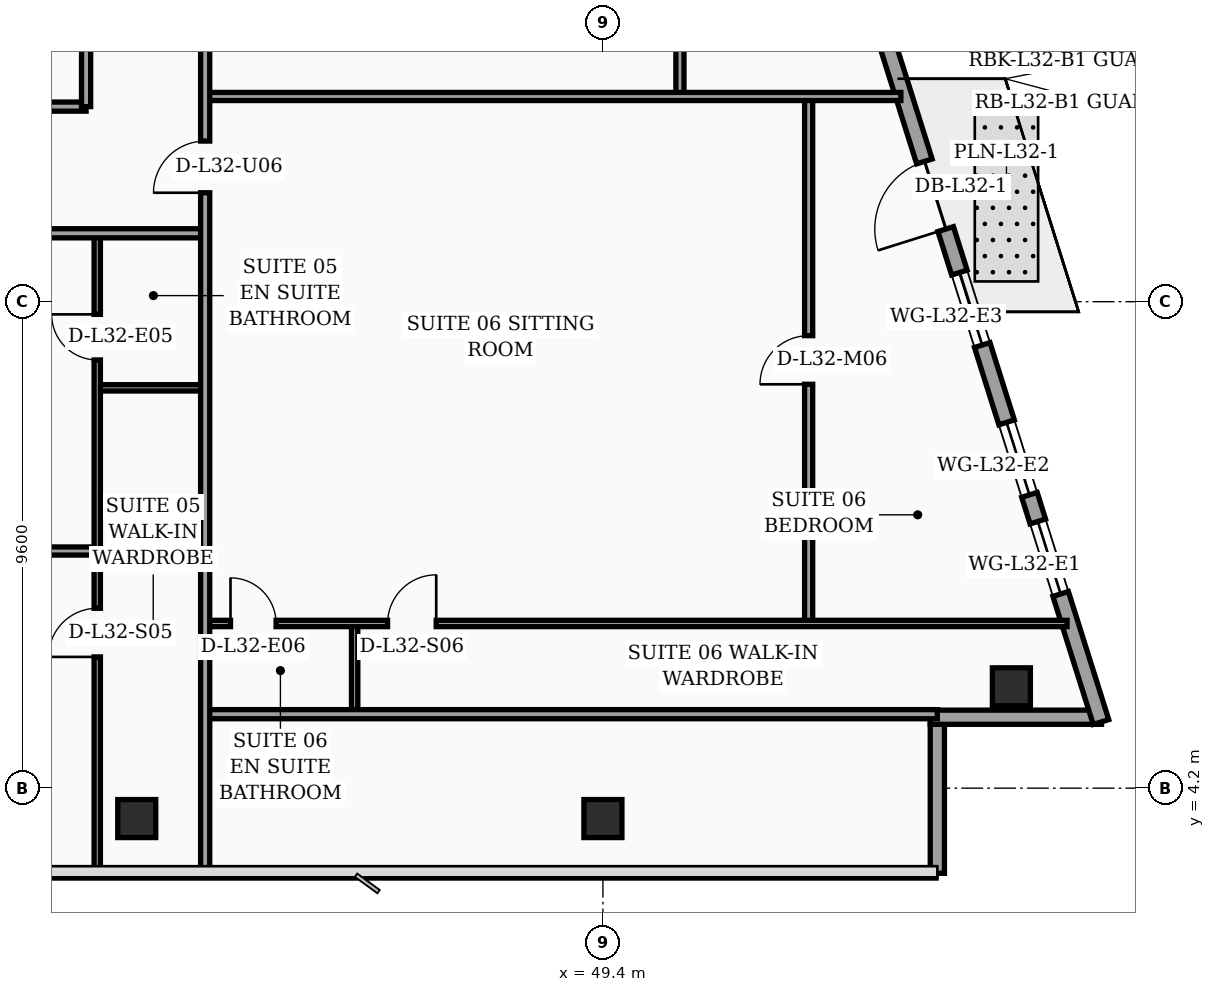
"""IFC4 building model, lengths in metres.
Left out: names, types, materials, properties, quantities, classifications, styles, units other than length and angle.
Written with IfcOpenShell. Run it as: python <this file> out.ifc"""

import sys

from ifc_helpers import new_model, si_unit, direction, frame, frame_2d, origin, origin_2d, place, context, subcontext, project, spatial, rectangle, hollow_rectangle, extrude, element, fill, save


model = new_model("IFC4")
c1 = context("Model", 3, precision=1e-05, world=origin(), true_north=direction((0.0, 1.0)))
c2 = subcontext(c1, "Body", "Model", "MODEL_VIEW")
j1 = project(units=[si_unit("LENGTHUNIT", "METRE"), si_unit("PLANEANGLEUNIT", "RADIAN")], contexts=[c1])
p1 = place(None, origin())
s1 = spatial("IfcSite", under=j1, at=p1, CompositionType="ELEMENT")
p2 = place(p1, origin())
s2 = spatial("IfcBuilding", under=s1, at=p2, CompositionType="ELEMENT")
p3 = place(p2, frame((0.0, 0.0, 131.6)))
s3 = spatial("IfcBuildingStorey", under=s2, at=p3, CompositionType="ELEMENT", Elevation=131.6)
for number, where, z_axis, x_axis in (
    (1, (40.2, 3.6, 0.0), (0.0, 0.0, 1.0), (1.0, 0.0, 0.0)),
    (2, (49.4, 3.6, 0.0), (0.0, 0.0, 1.0), (1.0, 0.0, 0.0)),
    (3, (57.461, 6.2, 0.0), (0.0, 0.0, 1.0), (1.0, 0.0, 0.0)),
):
    element("IfcColumn", number, at=place(p3, frame(where, z_axis=z_axis, x_axis=x_axis)), inside=s3, PredefinedType="COLUMN", context=c2, shape_type="SweptSolid", body=[
        extrude(hollow_rectangle(XDim=0.75, YDim=0.75, WallThickness=0.032, at=origin_2d()), origin(), (0.0, 0.0, 1.0), 3.56),
    ])
p4 = place(p3, frame((56.0, 2.52, 0.0), z_axis=(0.0, 0.0, 1.0), x_axis=(0.0, 1.0, 0.0)))
e4 = element("IfcWall", 4, at=p4, inside=s3, PredefinedType="SOLIDWALL", context=c2, shape_type="SweptSolid", body=[
    extrude(rectangle(XDim=2.94, YDim=0.28, at=frame_2d((1.47, 0.0))), origin(), (0.0, 0.0, 1.0), 3.04),
])
p5 = place(p3, frame((55.86, 5.6, 0.0), z_axis=(0.0, 0.0, 1.0), x_axis=(1.0, 0.0, 0.0)))
e5 = element("IfcWall", 5, at=p5, inside=s3, PredefinedType="SOLIDWALL", context=c2, shape_type="SweptSolid", body=[
    extrude(rectangle(XDim=3.38, YDim=0.28, at=frame_2d((1.69, 0.0))), origin(), (0.0, 0.0, 1.0), 3.04),
])
p6 = place(p3, frame((59.23, 5.505, 0.0), z_axis=(0.0, 0.0, 1.0), x_axis=(-0.300509063924, 0.953778958931, 0.0)))
e6 = element("IfcWall", 6, at=p6, inside=s3, PredefinedType="SOLIDWALL", context=c2, shape_type="SweptSolid", body=[
    extrude(rectangle(XDim=30.814, YDim=0.32, at=frame_2d((15.407, 0.0))), origin(), (0.0, 0.0, 1.0), 3.56),
])
p7 = place(p6, frame((10.199, 0.0, 0.0)))
e7 = element("IfcOpeningElement", 7, at=p7, cuts=e6, PredefinedType="OPENING", context=c2, shape_type="SweptSolid", body=[
    extrude(rectangle(XDim=1.4, YDim=2.25, at=frame_2d((0.7, 1.125))), frame((0.0, 0.17, 0.0), z_axis=(0.0, -1.0, 0.0), x_axis=(1.0, 0.0, 0.0)), (0.0, 0.0, 1.0), 0.34),
])
p8 = place(p6, frame((2.65, 0.0, 0.75)))
e8 = element("IfcOpeningElement", 8, at=p8, cuts=e6, PredefinedType="OPENING", context=c2, shape_type="SweptSolid", body=[
    extrude(rectangle(XDim=1.5, YDim=1.6, at=frame_2d((0.75, 0.8))), frame((0.0, 0.17, 0.0), z_axis=(0.0, -1.0, 0.0), x_axis=(1.0, 0.0, 0.0)), (0.0, 0.0, 1.0), 0.34),
])
p9 = place(p6, frame((4.7, 0.0, 0.75)))
e9 = element("IfcOpeningElement", 9, at=p9, cuts=e6, PredefinedType="OPENING", context=c2, shape_type="SweptSolid", body=[
    extrude(rectangle(XDim=1.5, YDim=1.6, at=frame_2d((0.75, 0.8))), frame((0.0, 0.17, 0.0), z_axis=(0.0, -1.0, 0.0), x_axis=(1.0, 0.0, 0.0)), (0.0, 0.0, 1.0), 0.34),
])
p10 = place(p6, frame((7.8, 0.0, 0.75)))
e10 = element("IfcOpeningElement", 10, at=p10, cuts=e6, PredefinedType="OPENING", context=c2, shape_type="SweptSolid", body=[
    extrude(rectangle(XDim=1.5, YDim=1.6, at=frame_2d((0.75, 0.8))), frame((0.0, 0.17, 0.0), z_axis=(0.0, -1.0, 0.0), x_axis=(1.0, 0.0, 0.0)), (0.0, 0.0, 1.0), 0.34),
])
p11 = place(p6, frame((14.0, 0.0, 0.75)))
e11 = element("IfcOpeningElement", 11, at=p11, cuts=e6, PredefinedType="OPENING", context=c2, shape_type="SweptSolid", body=[
    extrude(rectangle(XDim=1.5, YDim=1.6, at=frame_2d((0.75, 0.8))), frame((0.0, 0.17, 0.0), z_axis=(0.0, -1.0, 0.0), x_axis=(1.0, 0.0, 0.0)), (0.0, 0.0, 1.0), 0.34),
])
p12 = place(p6, frame((17.1, 0.0, 0.75)))
e12 = element("IfcOpeningElement", 12, at=p12, cuts=e6, PredefinedType="OPENING", context=c2, shape_type="SweptSolid", body=[
    extrude(rectangle(XDim=1.5, YDim=1.6, at=frame_2d((0.75, 0.8))), frame((0.0, 0.17, 0.0), z_axis=(0.0, -1.0, 0.0), x_axis=(1.0, 0.0, 0.0)), (0.0, 0.0, 1.0), 0.34),
])
p13 = place(p6, frame((23.3, 0.0, 0.75)))
e13 = element("IfcOpeningElement", 13, at=p13, cuts=e6, PredefinedType="OPENING", context=c2, shape_type="SweptSolid", body=[
    extrude(rectangle(XDim=1.5, YDim=1.6, at=frame_2d((0.75, 0.8))), frame((0.0, 0.17, 0.0), z_axis=(0.0, -1.0, 0.0), x_axis=(1.0, 0.0, 0.0)), (0.0, 0.0, 1.0), 0.34),
])
p14 = place(p6, frame((27.45, 0.0, 0.75)))
e14 = element("IfcOpeningElement", 14, at=p14, cuts=e6, PredefinedType="OPENING", context=c2, shape_type="SweptSolid", body=[
    extrude(rectangle(XDim=1.5, YDim=1.6, at=frame_2d((0.75, 0.8))), frame((0.0, 0.17, 0.0), z_axis=(0.0, -1.0, 0.0), x_axis=(1.0, 0.0, 0.0)), (0.0, 0.0, 1.0), 0.34),
])
p15 = place(p3, frame((39.42, 12.1, 0.0), z_axis=(0.0, 0.0, 1.0), x_axis=(1.0, 0.0, 0.0)))
e15 = element("IfcWall", 15, at=p15, inside=s3, PredefinedType="PARTITIONING", context=c2, shape_type="SweptSolid", body=[
    extrude(rectangle(XDim=2.13, YDim=0.125, at=frame_2d((1.065, 0.0))), origin(), (0.0, 0.0, 1.0), 3.56),
])
p16 = place(p3, frame((32.4, 8.88, 0.0), z_axis=(0.0, 0.0, 1.0), x_axis=(1.0, 0.0, 0.0)))
e16 = element("IfcWall", 16, at=p16, inside=s3, PredefinedType="PARTITIONING", context=c2, shape_type="SweptSolid", body=[
    extrude(rectangle(XDim=7.02, YDim=0.16, at=frame_2d((3.51, 0.0))), origin(), (0.0, 0.0, 1.0), 2.84),
])
p17 = place(p16, frame((3.03, 0.0, 0.0)))
e17 = element("IfcOpeningElement", 17, at=p17, cuts=e16, PredefinedType="OPENING", context=c2, shape_type="SweptSolid", body=[
    extrude(rectangle(XDim=0.96, YDim=2.2, at=frame_2d((0.48, 1.1))), frame((0.0, 0.09, 0.0), z_axis=(0.0, -1.0, 0.0), x_axis=(1.0, 0.0, 0.0)), (0.0, 0.0, 1.0), 0.18),
])
p18 = place(p3, frame((39.42, 2.44, 0.0), z_axis=(0.0, 0.0, 1.0), x_axis=(0.0, 1.0, 0.0)))
e18 = element("IfcWall", 18, at=p18, inside=s3, PredefinedType="PARTITIONING", context=c2, shape_type="SweptSolid", body=[
    extrude(rectangle(XDim=12.71, YDim=0.125, at=frame_2d((6.355, 0.0))), origin(), (0.0, 0.0, 1.0), 2.84),
])
p19 = place(p18, frame((4.35, 0.0, 0.0)))
e19 = element("IfcOpeningElement", 19, at=p19, cuts=e18, PredefinedType="OPENING", context=c2, shape_type="SweptSolid", body=[
    extrude(rectangle(XDim=0.96, YDim=2.2, at=frame_2d((0.48, 1.1))), frame((0.0, 0.073, 0.0), z_axis=(0.0, -1.0, 0.0), x_axis=(1.0, 0.0, 0.0)), (0.0, 0.0, 1.0), 0.145),
])
p20 = place(p18, frame((10.21, 0.0, 0.0)))
e20 = element("IfcOpeningElement", 20, at=p20, cuts=e18, PredefinedType="OPENING", context=c2, shape_type="SweptSolid", body=[
    extrude(rectangle(XDim=0.9, YDim=2.15, at=frame_2d((0.45, 1.075))), frame((0.0, 0.073, 0.0), z_axis=(0.0, -1.0, 0.0), x_axis=(1.0, 0.0, 0.0)), (0.0, 0.0, 1.0), 0.145),
])
p21 = place(p3, frame((32.4, 15.15, 0.0), z_axis=(0.0, 0.0, 1.0), x_axis=(1.0, 0.0, 0.0)))
e21 = element("IfcWall", 21, at=p21, inside=s3, PredefinedType="PARTITIONING", context=c2, shape_type="SweptSolid", body=[
    extrude(rectangle(XDim=9.15, YDim=0.18, at=frame_2d((4.575, 0.0))), origin(), (0.0, 0.0, 1.0), 2.84),
])
p22 = place(p21, frame((3.1, 0.0, 0.0)))
e22 = element("IfcOpeningElement", 22, at=p22, cuts=e21, PredefinedType="OPENING", context=c2, shape_type="SweptSolid", body=[
    extrude(rectangle(XDim=1.02, YDim=2.2, at=frame_2d((0.51, 1.1))), frame((0.0, 0.1, 0.0), z_axis=(0.0, -1.0, 0.0), x_axis=(1.0, 0.0, 0.0)), (0.0, 0.0, 1.0), 0.2),
])
p23 = place(p3, frame((21.5, 17.65, 0.0), z_axis=(0.0, 0.0, 1.0), x_axis=(1.0, 0.0, 0.0)))
e23 = element("IfcWall", 23, at=p23, inside=s3, PredefinedType="PARTITIONING", context=c2, shape_type="SweptSolid", body=[
    extrude(rectangle(XDim=17.7, YDim=0.18, at=frame_2d((8.85, 0.0))), origin(), (0.0, 0.0, 1.0), 2.84),
])
p24 = place(p23, frame((0.95, 0.0, 0.0)))
e24 = element("IfcOpeningElement", 24, at=p24, cuts=e23, PredefinedType="OPENING", context=c2, shape_type="SweptSolid", body=[
    extrude(rectangle(XDim=1.02, YDim=2.2, at=frame_2d((0.51, 1.1))), frame((0.0, 0.1, 0.0), z_axis=(0.0, -1.0, 0.0), x_axis=(1.0, 0.0, 0.0)), (0.0, 0.0, 1.0), 0.2),
])
p25 = place(p23, frame((10.4, 0.0, 0.0)))
e25 = element("IfcOpeningElement", 25, at=p25, cuts=e23, PredefinedType="OPENING", context=c2, shape_type="SweptSolid", body=[
    extrude(rectangle(XDim=1.02, YDim=2.2, at=frame_2d((0.51, 1.1))), frame((0.0, 0.1, 0.0), z_axis=(0.0, -1.0, 0.0), x_axis=(1.0, 0.0, 0.0)), (0.0, 0.0, 1.0), 0.2),
])
p26 = place(p3, frame((39.2, 17.65, 0.0), z_axis=(0.0, 0.0, 1.0), x_axis=(0.0, 1.0, 0.0)))
e26 = element("IfcWall", 26, at=p26, inside=s3, PredefinedType="PARTITIONING", context=c2, shape_type="SweptSolid", body=[
    extrude(rectangle(XDim=16.64, YDim=0.18, at=frame_2d((8.32, 0.0))), origin(), (0.0, 0.0, 1.0), 2.84),
])
p27 = place(p3, frame((44.5, 5.66, 0.0), z_axis=(0.0, 0.0, 1.0), x_axis=(0.0, 1.0, 0.0)))
e27 = element("IfcWall", 27, at=p27, inside=s3, PredefinedType="PARTITIONING", context=c2, shape_type="SweptSolid", body=[
    extrude(rectangle(XDim=1.79, YDim=0.125, at=frame_2d((0.895, 0.0))), origin(), (0.0, 0.0, 1.0), 3.56),
])
p28 = place(p3, frame((53.46, 7.45, 0.0), z_axis=(0.0, 0.0, 1.0), x_axis=(0.0, 1.0, 0.0)))
e28 = element("IfcWall", 28, at=p28, inside=s3, PredefinedType="PARTITIONING", context=c2, shape_type="SweptSolid", body=[
    extrude(rectangle(XDim=10.4, YDim=0.16, at=frame_2d((5.2, 0.0))), origin(), (0.0, 0.0, 1.0), 3.04),
])
p29 = place(p28, frame((4.72, 0.0, 0.0)))
e29 = element("IfcOpeningElement", 29, at=p29, cuts=e28, PredefinedType="OPENING", context=c2, shape_type="SweptSolid", body=[
    extrude(rectangle(XDim=0.96, YDim=2.2, at=frame_2d((0.48, 1.1))), frame((0.0, 0.09, 0.0), z_axis=(0.0, -1.0, 0.0), x_axis=(1.0, 0.0, 0.0)), (0.0, 0.0, 1.0), 0.18),
])
p30 = place(p3, frame((41.55, 7.45, 0.0), z_axis=(0.0, 0.0, 1.0), x_axis=(1.0, 0.0, 0.0)))
e30 = element("IfcWall", 30, at=p30, inside=s3, PredefinedType="PARTITIONING", context=c2, shape_type="SweptSolid", body=[
    extrude(rectangle(XDim=17.01, YDim=0.125, at=frame_2d((8.505, 0.0))), origin(), (0.0, 0.0, 1.0), 2.84),
])
p31 = place(p30, frame((0.5, 0.0, 0.0)))
e31 = element("IfcOpeningElement", 31, at=p31, cuts=e30, PredefinedType="OPENING", context=c2, shape_type="SweptSolid", body=[
    extrude(rectangle(XDim=0.9, YDim=2.15, at=frame_2d((0.45, 1.075))), frame((0.0, 0.073, 0.0), z_axis=(0.0, -1.0, 0.0), x_axis=(1.0, 0.0, 0.0)), (0.0, 0.0, 1.0), 0.145),
])
p32 = place(p30, frame((3.6, 0.0, 0.0)))
e32 = element("IfcOpeningElement", 32, at=p32, cuts=e30, PredefinedType="OPENING", context=c2, shape_type="SweptSolid", body=[
    extrude(rectangle(XDim=0.96, YDim=2.2, at=frame_2d((0.48, 1.1))), frame((0.0, 0.073, 0.0), z_axis=(0.0, -1.0, 0.0), x_axis=(1.0, 0.0, 0.0)), (0.0, 0.0, 1.0), 0.145),
])
p33 = place(p3, frame((41.55, 5.66, 0.0), z_axis=(0.0, 0.0, 1.0), x_axis=(1.0, 0.0, 0.0)))
e33 = element("IfcWall", 33, at=p33, inside=s3, PredefinedType="PARTITIONING", context=c2, shape_type="SweptSolid", body=[
    extrude(rectangle(XDim=14.45, YDim=0.18, at=frame_2d((7.225, 0.0))), origin(), (0.0, 0.0, 1.0), 2.84),
])
p34 = place(p3, frame((50.92, 17.85, 0.0), z_axis=(0.0, 0.0, 1.0), x_axis=(0.0, 1.0, 0.0)))
e34 = element("IfcWall", 34, at=p34, inside=s3, PredefinedType="PARTITIONING", context=c2, shape_type="SweptSolid", body=[
    extrude(rectangle(XDim=5.74, YDim=0.16, at=frame_2d((2.87, 0.0))), origin(), (0.0, 0.0, 1.0), 2.84),
])
p35 = place(p34, frame((2.39, 0.0, 0.0)))
e35 = element("IfcOpeningElement", 35, at=p35, cuts=e34, PredefinedType="OPENING", context=c2, shape_type="SweptSolid", body=[
    extrude(rectangle(XDim=0.96, YDim=2.2, at=frame_2d((0.48, 1.1))), frame((0.0, 0.09, 0.0), z_axis=(0.0, -1.0, 0.0), x_axis=(1.0, 0.0, 0.0)), (0.0, 0.0, 1.0), 0.18),
])
p36 = place(p3, frame((41.55, 17.85, 0.0), z_axis=(0.0, 0.0, 1.0), x_axis=(1.0, 0.0, 0.0)))
e36 = element("IfcWall", 36, at=p36, inside=s3, PredefinedType="PARTITIONING", context=c2, shape_type="SweptSolid", body=[
    extrude(rectangle(XDim=13.73, YDim=0.16, at=frame_2d((6.865, 0.0))), origin(), (0.0, 0.0, 1.0), 2.84),
])
p37 = place(p3, frame((41.55, 2.44, 0.0), z_axis=(0.0, 0.0, 1.0), x_axis=(0.0, 1.0, 0.0)))
e37 = element("IfcWall", 37, at=p37, inside=s3, PredefinedType="PARTITIONING", context=c2, shape_type="SweptSolid", body=[
    extrude(rectangle(XDim=31.04, YDim=0.18, at=frame_2d((15.52, 0.0))), origin(), (0.0, 0.0, 1.0), 2.84),
])
p38 = place(p37, frame((13.51, 0.0, 0.0)))
e38 = element("IfcOpeningElement", 38, at=p38, cuts=e37, PredefinedType="OPENING", context=c2, shape_type="SweptSolid", body=[
    extrude(rectangle(XDim=1.02, YDim=2.2, at=frame_2d((0.51, 1.1))), frame((0.0, 0.1, 0.0), z_axis=(0.0, -1.0, 0.0), x_axis=(1.0, 0.0, 0.0)), (0.0, 0.0, 1.0), 0.2),
])
p39 = place(p37, frame((17.77, 0.0, 0.0)))
e39 = element("IfcOpeningElement", 39, at=p39, cuts=e37, PredefinedType="OPENING", context=c2, shape_type="SweptSolid", body=[
    extrude(rectangle(XDim=1.02, YDim=2.2, at=frame_2d((0.51, 1.1))), frame((0.0, 0.1, 0.0), z_axis=(0.0, -1.0, 0.0), x_axis=(1.0, 0.0, 0.0)), (0.0, 0.0, 1.0), 0.2),
])
p40 = place(p37, frame((25.58, 0.0, 0.0)))
e40 = element("IfcOpeningElement", 40, at=p40, cuts=e37, PredefinedType="OPENING", context=c2, shape_type="SweptSolid", body=[
    extrude(rectangle(XDim=1.02, YDim=2.2, at=frame_2d((0.51, 1.1))), frame((0.0, 0.1, 0.0), z_axis=(0.0, -1.0, 0.0), x_axis=(1.0, 0.0, 0.0)), (0.0, 0.0, 1.0), 0.2),
])
p41 = place(p7, origin())
e41 = element("IfcDoor", 41, at=p41, inside=s3, OperationType="SINGLE_SWING_LEFT", PredefinedType="DOOR", context=c2, shape_type="SweptSolid", body=[
    extrude(rectangle(XDim=1.4, YDim=2.25, at=frame_2d((0.7, 1.125))), frame((0.0, 0.025, 0.0), z_axis=(0.0, -1.0, 0.0), x_axis=(1.0, 0.0, 0.0)), (0.0, 0.0, 1.0), 0.05),
])
fill(e7, e41)
p42 = place(p8, origin())
e42 = element("IfcWindow", 42, at=p42, inside=s3, PartitioningType="SINGLE_PANEL", PredefinedType="WINDOW", context=c2, shape_type="SweptSolid", body=[
    extrude(rectangle(XDim=1.5, YDim=1.6, at=frame_2d((0.75, 0.8))), frame((0.0, 0.03, 0.0), z_axis=(0.0, -1.0, 0.0), x_axis=(1.0, 0.0, 0.0)), (0.0, 0.0, 1.0), 0.06),
])
fill(e8, e42)
p43 = place(p9, origin())
e43 = element("IfcWindow", 43, at=p43, inside=s3, PartitioningType="SINGLE_PANEL", PredefinedType="WINDOW", context=c2, shape_type="SweptSolid", body=[
    extrude(rectangle(XDim=1.5, YDim=1.6, at=frame_2d((0.75, 0.8))), frame((0.0, 0.03, 0.0), z_axis=(0.0, -1.0, 0.0), x_axis=(1.0, 0.0, 0.0)), (0.0, 0.0, 1.0), 0.06),
])
fill(e9, e43)
p44 = place(p10, origin())
e44 = element("IfcWindow", 44, at=p44, inside=s3, PartitioningType="SINGLE_PANEL", PredefinedType="WINDOW", context=c2, shape_type="SweptSolid", body=[
    extrude(rectangle(XDim=1.5, YDim=1.6, at=frame_2d((0.75, 0.8))), frame((0.0, 0.03, 0.0), z_axis=(0.0, -1.0, 0.0), x_axis=(1.0, 0.0, 0.0)), (0.0, 0.0, 1.0), 0.06),
])
fill(e10, e44)
p45 = place(p19, origin())
e45 = element("IfcDoor", 45, at=p45, inside=s3, OperationType="SINGLE_SWING_LEFT", PredefinedType="DOOR", context=c2, shape_type="SweptSolid", body=[
    extrude(rectangle(XDim=0.96, YDim=2.2, at=frame_2d((0.48, 1.1))), frame((0.0, 0.025, 0.0), z_axis=(0.0, -1.0, 0.0), x_axis=(1.0, 0.0, 0.0)), (0.0, 0.0, 1.0), 0.05),
])
fill(e19, e45)
p46 = place(p20, origin())
e46 = element("IfcDoor", 46, at=p46, inside=s3, OperationType="SINGLE_SWING_RIGHT", PredefinedType="DOOR", context=c2, shape_type="SweptSolid", body=[
    extrude(rectangle(XDim=0.9, YDim=2.15, at=frame_2d((0.45, 1.075))), frame((0.0, 0.025, 0.0), z_axis=(0.0, -1.0, 0.0), x_axis=(1.0, 0.0, 0.0)), (0.0, 0.0, 1.0), 0.05),
])
fill(e20, e46)
p47 = place(p29, origin())
e47 = element("IfcDoor", 47, at=p47, inside=s3, OperationType="SINGLE_SWING_LEFT", PredefinedType="DOOR", context=c2, shape_type="SweptSolid", body=[
    extrude(rectangle(XDim=0.96, YDim=2.2, at=frame_2d((0.48, 1.1))), frame((0.0, 0.025, 0.0), z_axis=(0.0, -1.0, 0.0), x_axis=(1.0, 0.0, 0.0)), (0.0, 0.0, 1.0), 0.05),
])
fill(e29, e47)
p48 = place(p31, origin())
e48 = element("IfcDoor", 48, at=p48, inside=s3, OperationType="SINGLE_SWING_LEFT", PredefinedType="DOOR", context=c2, shape_type="SweptSolid", body=[
    extrude(rectangle(XDim=0.9, YDim=2.15, at=frame_2d((0.45, 1.075))), frame((0.0, 0.025, 0.0), z_axis=(0.0, -1.0, 0.0), x_axis=(1.0, 0.0, 0.0)), (0.0, 0.0, 1.0), 0.05),
])
fill(e31, e48)
p49 = place(p32, origin())
e49 = element("IfcDoor", 49, at=p49, inside=s3, OperationType="SINGLE_SWING_RIGHT", PredefinedType="DOOR", context=c2, shape_type="SweptSolid", body=[
    extrude(rectangle(XDim=0.96, YDim=2.2, at=frame_2d((0.48, 1.1))), frame((0.0, 0.025, 0.0), z_axis=(0.0, -1.0, 0.0), x_axis=(1.0, 0.0, 0.0)), (0.0, 0.0, 1.0), 0.05),
])
fill(e32, e49)
p50 = place(p38, origin())
e50 = element("IfcDoor", 50, at=p50, inside=s3, OperationType="SINGLE_SWING_LEFT", PredefinedType="DOOR", context=c2, shape_type="SweptSolid", body=[
    extrude(rectangle(XDim=1.02, YDim=2.2, at=frame_2d((0.51, 1.1))), frame((0.0, 0.025, 0.0), z_axis=(0.0, -1.0, 0.0), x_axis=(1.0, 0.0, 0.0)), (0.0, 0.0, 1.0), 0.05),
])
fill(e38, e50)
save(model, sys.argv[1])
